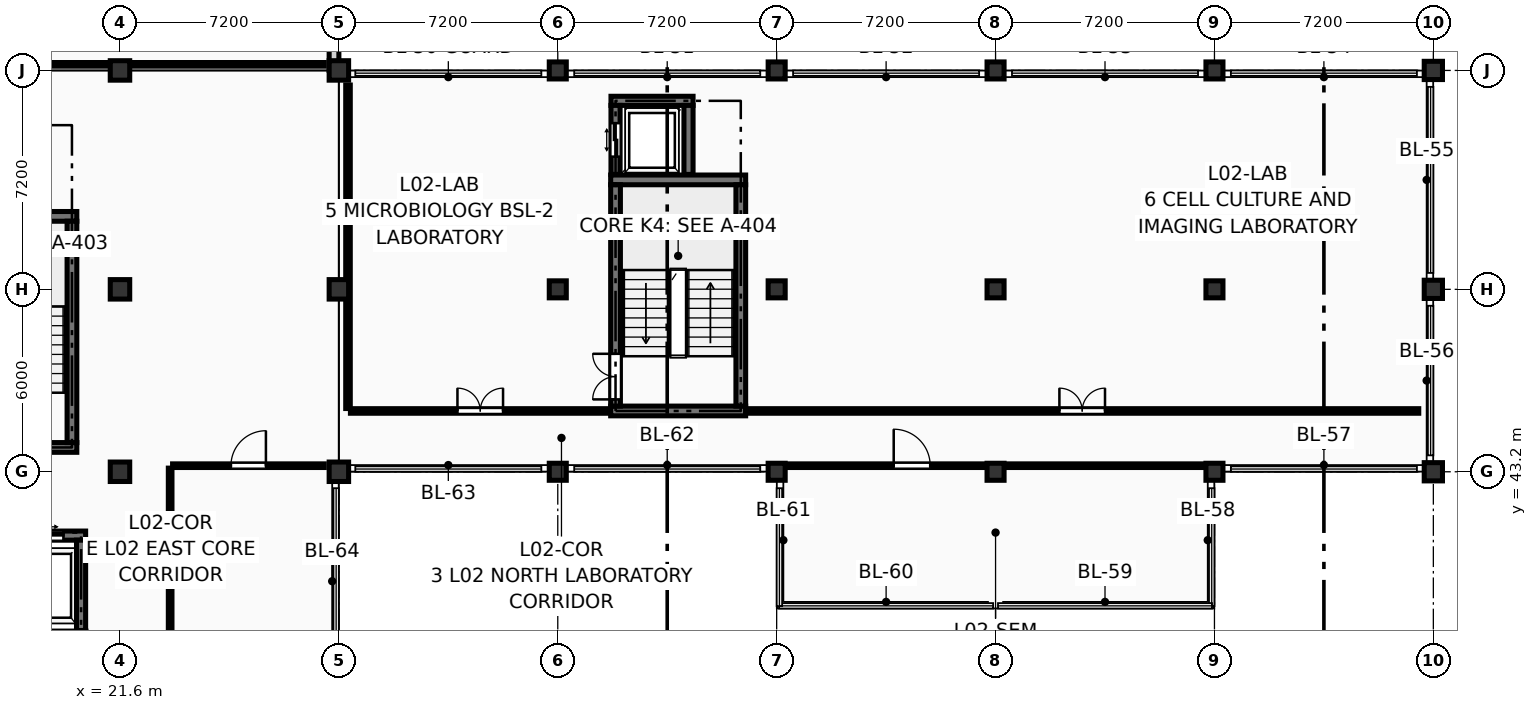
"""IFC4 building model, lengths in metres.
Left out: names, types, materials, properties, quantities, classifications, styles, units other than length and angle.
Written with IfcOpenShell. Run it as: python <this file> out.ifc"""

import sys

from ifc_helpers import new_model, si_unit, direction, frame, frame_2d, origin, origin_2d, place, context, subcontext, project, spatial, rectangle, extrude, element, fill, save


model = new_model("IFC4")
c1 = context("Model", 3, precision=1e-05, world=origin(), true_north=direction((0.0, 1.0)))
c2 = subcontext(c1, "Body", "Model", "MODEL_VIEW")
j1 = project(units=[si_unit("LENGTHUNIT", "METRE"), si_unit("PLANEANGLEUNIT", "RADIAN")], contexts=[c1])
p1 = place(None, origin())
s1 = spatial("IfcSite", under=j1, at=p1, CompositionType="ELEMENT")
p2 = place(p1, origin())
s2 = spatial("IfcBuilding", under=s1, at=p2, CompositionType="ELEMENT")
p3 = place(p2, frame((0.0, 0.0, 8.55)))
s3 = spatial("IfcBuildingStorey", under=s2, at=p3, CompositionType="ELEMENT", Elevation=8.55)
for number, where, z_axis, x_axis in (
    (1, (21.6, 43.2, 0.0), (0.0, 0.0, 1.0), (1.0, 0.0, 0.0)),
    (2, (21.6, 49.2, 0.0), (0.0, 0.0, 1.0), (1.0, 0.0, 0.0)),
    (3, (21.6, 56.4, 0.0), (0.0, 0.0, 1.0), (1.0, 0.0, 0.0)),
    (4, (28.8, 43.2, 0.0), (0.0, 0.0, 1.0), (1.0, 0.0, 0.0)),
    (5, (28.8, 49.2, 0.0), (0.0, 0.0, 1.0), (1.0, 0.0, 0.0)),
    (6, (28.8, 56.4, 0.0), (0.0, 0.0, 1.0), (1.0, 0.0, 0.0)),
):
    element("IfcColumn", number, at=place(p3, frame(where, z_axis=z_axis, x_axis=x_axis)), inside=s3, PredefinedType="COLUMN", context=c2, shape_type="SweptSolid", body=[
        extrude(rectangle(XDim=0.64, YDim=0.64, at=origin_2d()), origin(), (0.0, 0.0, 1.0), 3.6),
    ])
for number, where, z_axis, x_axis in (
    (7, (36.0, 43.2, 0.0), (0.0, 0.0, 1.0), (1.0, 0.0, 0.0)),
    (8, (36.0, 49.2, 0.0), (0.0, 0.0, 1.0), (1.0, 0.0, 0.0)),
    (9, (36.0, 56.4, 0.0), (0.0, 0.0, 1.0), (1.0, 0.0, 0.0)),
    (10, (43.2, 43.2, 0.0), (0.0, 0.0, 1.0), (1.0, 0.0, 0.0)),
    (11, (43.2, 49.2, 0.0), (0.0, 0.0, 1.0), (1.0, 0.0, 0.0)),
    (12, (43.2, 56.4, 0.0), (0.0, 0.0, 1.0), (1.0, 0.0, 0.0)),
    (13, (50.4, 43.2, 0.0), (0.0, 0.0, 1.0), (1.0, 0.0, 0.0)),
    (14, (50.4, 49.2, 0.0), (0.0, 0.0, 1.0), (1.0, 0.0, 0.0)),
    (15, (50.4, 56.4, 0.0), (0.0, 0.0, 1.0), (1.0, 0.0, 0.0)),
    (16, (57.6, 43.2, 0.0), (0.0, 0.0, 1.0), (1.0, 0.0, 0.0)),
    (17, (57.6, 49.2, 0.0), (0.0, 0.0, 1.0), (1.0, 0.0, 0.0)),
    (18, (57.6, 56.4, 0.0), (0.0, 0.0, 1.0), (1.0, 0.0, 0.0)),
):
    element("IfcColumn", number, at=place(p3, frame(where, z_axis=z_axis, x_axis=x_axis)), inside=s3, PredefinedType="COLUMN", context=c2, shape_type="SweptSolid", body=[
        extrude(rectangle(XDim=0.56, YDim=0.56, at=origin_2d()), origin(), (0.0, 0.0, 1.0), 3.6),
    ])
for number, where, z_axis, x_axis in (
    (19, (64.8, 43.2, 0.0), (0.0, 0.0, 1.0), (1.0, 0.0, 0.0)),
    (20, (64.8, 49.2, 0.0), (0.0, 0.0, 1.0), (1.0, 0.0, 0.0)),
    (21, (64.8, 56.4, 0.0), (0.0, 0.0, 1.0), (1.0, 0.0, 0.0)),
):
    element("IfcColumn", number, at=place(p3, frame(where, z_axis=z_axis, x_axis=x_axis)), inside=s3, PredefinedType="COLUMN", context=c2, shape_type="SweptSolid", body=[
        extrude(rectangle(XDim=0.6, YDim=0.6, at=origin_2d()), origin(), (0.0, 0.0, 1.0), 3.6),
    ])
p4 = place(p3, frame((28.64, 56.4, 0.0), z_axis=(0.0, 0.0, 1.0), x_axis=(0.0, 1.0, 0.0)))
e22 = element("IfcWall", 22, at=p4, inside=s3, PredefinedType="SOLIDWALL", context=c2, shape_type="SweptSolid", body=[
    extrude(rectangle(XDim=7.2, YDim=0.32, at=frame_2d((3.6, 0.0))), origin(), (0.0, 0.0, 1.0), 2.84),
])
for number, where, z_axis, x_axis in (
    (23, (15.74, 44.0, 0.0), (0.0, 0.0, 1.0), (1.0, 0.0, 0.0)),
    (24, (15.74, 51.6, 0.0), (0.0, 0.0, 1.0), (1.0, 0.0, 0.0)),
):
    element("IfcWall", number, at=place(p3, frame(where, z_axis=z_axis, x_axis=x_axis)), inside=s3, PredefinedType="SHEAR", context=c2, shape_type="SweptSolid", body=[
        extrude(rectangle(XDim=4.44, YDim=0.32, at=frame_2d((2.22, 0.0))), origin(), (0.0, 0.0, 1.0), 3.39),
    ])
p5 = place(p3, frame((20.02, 44.16, 0.0), z_axis=(0.0, 0.0, 1.0), x_axis=(0.0, 1.0, 0.0)))
e25 = element("IfcWall", 25, at=p5, inside=s3, PredefinedType="SHEAR", context=c2, shape_type="SweptSolid", body=[
    extrude(rectangle(XDim=7.28, YDim=0.32, at=frame_2d((3.64, 0.0))), origin(), (0.0, 0.0, 1.0), 3.39),
])
for number, where, z_axis, x_axis in (
    (26, (37.74, 45.2, 0.0), (0.0, 0.0, 1.0), (1.0, 0.0, 0.0)),
    (27, (37.74, 52.8, 0.0), (0.0, 0.0, 1.0), (1.0, 0.0, 0.0)),
):
    element("IfcWall", number, at=place(p3, frame(where, z_axis=z_axis, x_axis=x_axis)), inside=s3, PredefinedType="SHEAR", context=c2, shape_type="SweptSolid", body=[
        extrude(rectangle(XDim=4.44, YDim=0.32, at=frame_2d((2.22, 0.0))), origin(), (0.0, 0.0, 1.0), 3.39),
    ])
p6 = place(p3, frame((37.9, 45.36, 0.0), z_axis=(0.0, 0.0, 1.0), x_axis=(0.0, 1.0, 0.0)))
e28 = element("IfcWall", 28, at=p6, inside=s3, PredefinedType="SHEAR", context=c2, shape_type="SweptSolid", body=[
    extrude(rectangle(XDim=7.28, YDim=0.32, at=frame_2d((3.64, 0.0))), origin(), (0.0, 0.0, 1.0), 3.39),
])
p7 = place(p6, frame((0.22, 0.0, 0.0)))
e29 = element("IfcOpeningElement", 29, at=p7, cuts=e28, PredefinedType="OPENING", context=c2, shape_type="SweptSolid", body=[
    extrude(rectangle(XDim=1.5, YDim=2.2, at=frame_2d((0.75, 1.1))), frame((0.0, 0.172, 0.0), z_axis=(0.0, -1.0, 0.0), x_axis=(1.0, 0.0, 0.0)), (0.0, 0.0, 1.0), 0.344),
])
p8 = place(p3, frame((42.02, 45.36, 0.0), z_axis=(0.0, 0.0, 1.0), x_axis=(0.0, 1.0, 0.0)))
e30 = element("IfcWall", 30, at=p8, inside=s3, PredefinedType="SHEAR", context=c2, shape_type="SweptSolid", body=[
    extrude(rectangle(XDim=7.28, YDim=0.32, at=frame_2d((3.64, 0.0))), origin(), (0.0, 0.0, 1.0), 3.39),
])
p9 = place(p3, frame((17.91, 41.1, 0.0), z_axis=(0.0, 0.0, 1.0), x_axis=(1.0, 0.0, 0.0)))
e31 = element("IfcWall", 31, at=p9, inside=s3, PredefinedType="SHEAR", context=c2, shape_type="SweptSolid", body=[
    extrude(rectangle(XDim=2.56, YDim=0.3, at=frame_2d((1.28, 0.0))), origin(), (0.0, 0.0, 1.0), 3.39),
])
p10 = place(p9, frame((0.73, 0.0, 0.0)))
e32 = element("IfcOpeningElement", 32, at=p10, cuts=e31, PredefinedType="OPENING", context=c2, shape_type="SweptSolid", body=[
    extrude(rectangle(XDim=1.1, YDim=2.2, at=frame_2d((0.55, 1.1))), frame((0.0, 0.162, 0.0), z_axis=(0.0, -1.0, 0.0), x_axis=(1.0, 0.0, 0.0)), (0.0, 0.0, 1.0), 0.324),
])
p11 = place(p3, frame((20.32, 37.98, 0.0), z_axis=(0.0, 0.0, 1.0), x_axis=(0.0, 1.0, 0.0)))
e33 = element("IfcWall", 33, at=p11, inside=s3, PredefinedType="SHEAR", context=c2, shape_type="SweptSolid", body=[
    extrude(rectangle(XDim=2.97, YDim=0.3, at=frame_2d((1.485, 0.0))), origin(), (0.0, 0.0, 1.0), 3.39),
])
p12 = place(p3, frame((37.75, 55.4, 0.0), z_axis=(0.0, 0.0, 1.0), x_axis=(1.0, 0.0, 0.0)))
e34 = element("IfcWall", 34, at=p12, inside=s3, PredefinedType="SHEAR", context=c2, shape_type="SweptSolid", body=[
    extrude(rectangle(XDim=2.7, YDim=0.3, at=frame_2d((1.35, 0.0))), origin(), (0.0, 0.0, 1.0), 3.39),
])
p13 = place(p3, frame((37.9, 52.98, 0.0), z_axis=(0.0, 0.0, 1.0), x_axis=(0.0, 1.0, 0.0)))
e35 = element("IfcWall", 35, at=p13, inside=s3, PredefinedType="SHEAR", context=c2, shape_type="SweptSolid", body=[
    extrude(rectangle(XDim=2.27, YDim=0.3, at=frame_2d((1.135, 0.0))), origin(), (0.0, 0.0, 1.0), 3.39),
])
p14 = place(p13, frame((0.585, 0.0, 0.0)))
e36 = element("IfcOpeningElement", 36, at=p14, cuts=e35, PredefinedType="OPENING", context=c2, shape_type="SweptSolid", body=[
    extrude(rectangle(XDim=1.1, YDim=2.2, at=frame_2d((0.55, 1.1))), frame((0.0, 0.162, 0.0), z_axis=(0.0, -1.0, 0.0), x_axis=(1.0, 0.0, 0.0)), (0.0, 0.0, 1.0), 0.324),
])
p15 = place(p3, frame((40.3, 52.98, 0.0), z_axis=(0.0, 0.0, 1.0), x_axis=(0.0, 1.0, 0.0)))
e37 = element("IfcWall", 37, at=p15, inside=s3, PredefinedType="SHEAR", context=c2, shape_type="SweptSolid", body=[
    extrude(rectangle(XDim=2.27, YDim=0.3, at=frame_2d((1.135, 0.0))), origin(), (0.0, 0.0, 1.0), 3.39),
])
p16 = place(p3, frame((23.25, 34.88, 0.0), z_axis=(0.0, 0.0, 1.0), x_axis=(0.0, 1.0, 0.0)))
e38 = element("IfcWall", 38, at=p16, inside=s3, PredefinedType="PARTITIONING", context=c2, shape_type="SweptSolid", body=[
    extrude(rectangle(XDim=8.44, YDim=0.12, at=frame_2d((4.22, 0.0))), origin(), (0.0, 0.0, 1.0), 3.375),
])
p17 = place(p3, frame((23.33, 43.4, 0.0), z_axis=(0.0, 0.0, 1.0), x_axis=(1.0, 0.0, 0.0)))
e39 = element("IfcWall", 39, at=p17, inside=s3, PredefinedType="PARTITIONING", context=c2, shape_type="SweptSolid", body=[
    extrude(rectangle(XDim=4.99, YDim=0.12, at=frame_2d((2.495, 0.0))), origin(), (0.0, 0.0, 1.0), 2.595),
])
p18 = place(p17, frame((1.92, 0.0, 0.0)))
e40 = element("IfcOpeningElement", 40, at=p18, cuts=e39, PredefinedType="OPENING", context=c2, shape_type="SweptSolid", body=[
    extrude(rectangle(XDim=1.15, YDim=2.18, at=frame_2d((0.575, 1.09))), frame((0.0, 0.072, 0.0), z_axis=(0.0, -1.0, 0.0), x_axis=(1.0, 0.0, 0.0)), (0.0, 0.0, 1.0), 0.144),
])
p19 = place(p3, frame((29.1, 45.28, 0.0), z_axis=(0.0, 0.0, 1.0), x_axis=(0.0, 1.0, 0.0)))
e41 = element("IfcWall", 41, at=p19, inside=s3, PredefinedType="PARTITIONING", context=c2, shape_type="SweptSolid", body=[
    extrude(rectangle(XDim=10.64, YDim=0.15, at=frame_2d((5.32, 0.0))), origin(), (0.0, 0.0, 1.0), 2.655),
])
p20 = place(p3, frame((29.18, 45.2, 0.0), z_axis=(0.0, 0.0, 1.0), x_axis=(1.0, 0.0, 0.0)))
e42 = element("IfcWall", 42, at=p20, inside=s3, PredefinedType="PARTITIONING", context=c2, shape_type="SweptSolid", body=[
    extrude(rectangle(XDim=8.54, YDim=0.15, at=frame_2d((4.27, 0.0))), origin(), (0.0, 0.0, 1.0), 3.375),
])
p21 = place(p20, frame((3.52, 0.0, 0.0)))
e43 = element("IfcOpeningElement", 43, at=p21, cuts=e42, PredefinedType="OPENING", context=c2, shape_type="SweptSolid", body=[
    extrude(rectangle(XDim=1.5, YDim=2.2, at=frame_2d((0.75, 1.1))), frame((0.0, 0.087, 0.0), z_axis=(0.0, -1.0, 0.0), x_axis=(1.0, 0.0, 0.0)), (0.0, 0.0, 1.0), 0.174),
])
p22 = place(p3, frame((42.18, 45.2, 0.0), z_axis=(0.0, 0.0, 1.0), x_axis=(1.0, 0.0, 0.0)))
e44 = element("IfcWall", 44, at=p22, inside=s3, PredefinedType="PARTITIONING", context=c2, shape_type="SweptSolid", body=[
    extrude(rectangle(XDim=22.14, YDim=0.15, at=frame_2d((11.07, 0.0))), origin(), (0.0, 0.0, 1.0), 3.375),
])
p23 = place(p22, frame((10.32, 0.0, 0.0)))
e45 = element("IfcOpeningElement", 45, at=p23, cuts=e44, PredefinedType="OPENING", context=c2, shape_type="SweptSolid", body=[
    extrude(rectangle(XDim=1.5, YDim=2.2, at=frame_2d((0.75, 1.1))), frame((0.0, 0.087, 0.0), z_axis=(0.0, -1.0, 0.0), x_axis=(1.0, 0.0, 0.0)), (0.0, 0.0, 1.0), 0.174),
])
p24 = place(p3, frame((43.58, 43.4, 0.0), z_axis=(0.0, 0.0, 1.0), x_axis=(1.0, 0.0, 0.0)))
e46 = element("IfcWall", 46, at=p24, inside=s3, PredefinedType="PARTITIONING", context=c2, shape_type="SweptSolid", body=[
    extrude(rectangle(XDim=13.64, YDim=0.12, at=frame_2d((6.82, 0.0))), origin(), (0.0, 0.0, 1.0), 2.595),
])
p25 = place(p24, frame((3.47, 0.0, 0.0)))
e47 = element("IfcOpeningElement", 47, at=p25, cuts=e46, PredefinedType="OPENING", context=c2, shape_type="SweptSolid", body=[
    extrude(rectangle(XDim=1.2, YDim=2.15, at=frame_2d((0.6, 1.075))), frame((0.0, 0.072, 0.0), z_axis=(0.0, -1.0, 0.0), x_axis=(1.0, 0.0, 0.0)), (0.0, 0.0, 1.0), 0.144),
])
p26 = place(p3, frame((16.08, 56.6, 0.0), z_axis=(0.0, 0.0, 1.0), x_axis=(1.0, 0.0, 0.0)))
e48 = element("IfcWall", 48, at=p26, inside=s3, PredefinedType="PARTITIONING", context=c2, shape_type="SweptSolid", body=[
    extrude(rectangle(XDim=12.24, YDim=0.12, at=frame_2d((6.12, 0.0))), origin(), (0.0, 0.0, 1.0), 2.595),
])
p27 = place(p7, origin())
e49 = element("IfcDoor", 49, at=p27, inside=s3, OperationType="DOUBLE_DOOR_SINGLE_SWING", PredefinedType="DOOR", context=c2, shape_type="SweptSolid", body=[
    extrude(rectangle(XDim=1.5, YDim=2.2, at=frame_2d((0.75, 1.1))), frame((0.0, 0.025, 0.0), z_axis=(0.0, -1.0, 0.0), x_axis=(1.0, 0.0, 0.0)), (0.0, 0.0, 1.0), 0.05),
])
fill(e29, e49)
p28 = place(p10, origin())
e50 = element("IfcDoor", 50, at=p28, inside=s3, OperationType="DOUBLE_DOOR_SLIDING", PredefinedType="DOOR", context=c2, shape_type="SweptSolid", body=[
    extrude(rectangle(XDim=1.1, YDim=2.2, at=frame_2d((0.55, 1.1))), frame((0.0, 0.025, 0.0), z_axis=(0.0, -1.0, 0.0), x_axis=(1.0, 0.0, 0.0)), (0.0, 0.0, 1.0), 0.05),
])
fill(e32, e50)
p29 = place(p14, origin())
e51 = element("IfcDoor", 51, at=p29, inside=s3, OperationType="DOUBLE_DOOR_SLIDING", PredefinedType="DOOR", context=c2, shape_type="SweptSolid", body=[
    extrude(rectangle(XDim=1.1, YDim=2.2, at=frame_2d((0.55, 1.1))), frame((0.0, 0.025, 0.0), z_axis=(0.0, -1.0, 0.0), x_axis=(1.0, 0.0, 0.0)), (0.0, 0.0, 1.0), 0.05),
])
fill(e36, e51)
p30 = place(p18, origin())
e52 = element("IfcDoor", 52, at=p30, inside=s3, OperationType="SINGLE_SWING_RIGHT", PredefinedType="DOOR", context=c2, shape_type="SweptSolid", body=[
    extrude(rectangle(XDim=1.15, YDim=2.18, at=frame_2d((0.575, 1.09))), frame((0.0, 0.025, 0.0), z_axis=(0.0, -1.0, 0.0), x_axis=(1.0, 0.0, 0.0)), (0.0, 0.0, 1.0), 0.05),
])
fill(e40, e52)
p31 = place(p21, origin())
e53 = element("IfcDoor", 53, at=p31, inside=s3, OperationType="DOUBLE_DOOR_SINGLE_SWING", PredefinedType="DOOR", context=c2, shape_type="SweptSolid", body=[
    extrude(rectangle(XDim=1.5, YDim=2.2, at=frame_2d((0.75, 1.1))), frame((0.0, 0.025, 0.0), z_axis=(0.0, -1.0, 0.0), x_axis=(1.0, 0.0, 0.0)), (0.0, 0.0, 1.0), 0.05),
])
fill(e43, e53)
p32 = place(p23, origin())
e54 = element("IfcDoor", 54, at=p32, inside=s3, OperationType="DOUBLE_DOOR_SINGLE_SWING", PredefinedType="DOOR", context=c2, shape_type="SweptSolid", body=[
    extrude(rectangle(XDim=1.5, YDim=2.2, at=frame_2d((0.75, 1.1))), frame((0.0, 0.025, 0.0), z_axis=(0.0, -1.0, 0.0), x_axis=(1.0, 0.0, 0.0)), (0.0, 0.0, 1.0), 0.05),
])
fill(e45, e54)
p33 = place(p25, origin())
e55 = element("IfcDoor", 55, at=p33, inside=s3, OperationType="SINGLE_SWING_LEFT", PredefinedType="DOOR", context=c2, shape_type="SweptSolid", body=[
    extrude(rectangle(XDim=1.2, YDim=2.15, at=frame_2d((0.6, 1.075))), frame((0.0, 0.025, 0.0), z_axis=(0.0, -1.0, 0.0), x_axis=(1.0, 0.0, 0.0)), (0.0, 0.0, 1.0), 0.05),
])
fill(e47, e55)
save(model, sys.argv[1])
